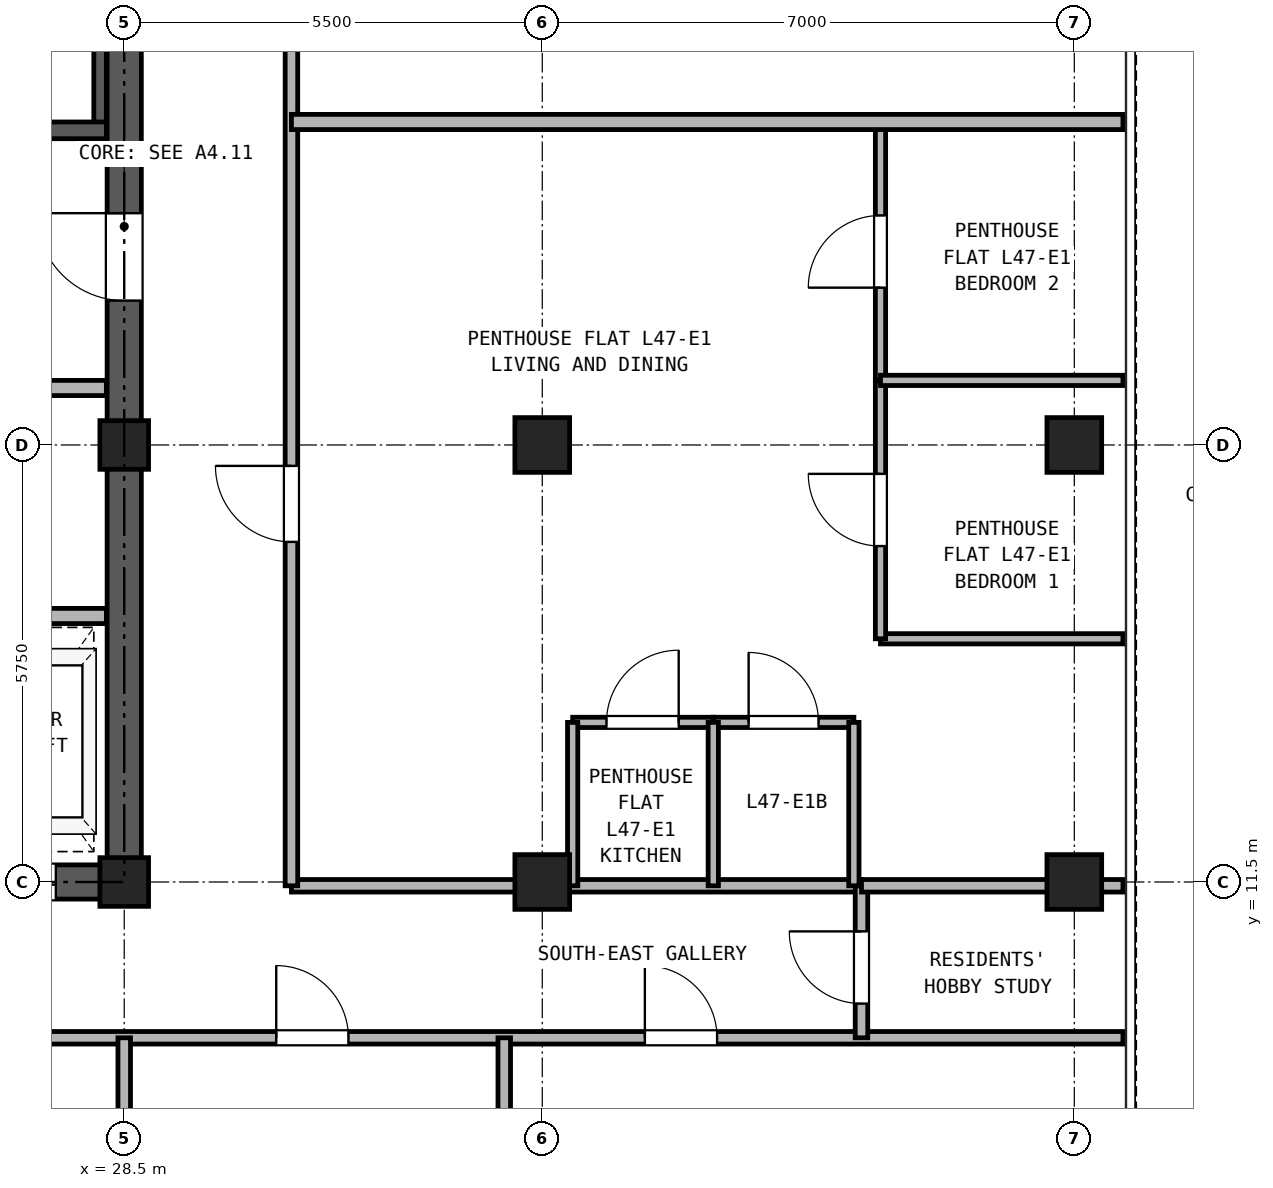
"""IFC4 building model, lengths in metres.
Left out: names, types, materials, properties, quantities, classifications, styles, units other than length and angle.
Written with IfcOpenShell. Run it as: python <this file> out.ifc"""

import sys

from ifc_helpers import new_model, si_unit, direction, frame, frame_2d, origin, origin_2d, place, context, subcontext, project, spatial, rectangle, hollow_rectangle, extrude, source, transform, mapped, element, fill, save


model = new_model("IFC4")
c1 = context("Model", 3, precision=1e-05, world=origin(), true_north=direction((0.0, 1.0)))
c2 = subcontext(c1, "Body", "Model", "MODEL_VIEW")
j1 = project(units=[si_unit("LENGTHUNIT", "METRE"), si_unit("PLANEANGLEUNIT", "RADIAN")], contexts=[c1])
p1 = place(None, origin())
s1 = spatial("IfcSite", under=j1, at=p1, CompositionType="ELEMENT")
p2 = place(p1, origin())
s2 = spatial("IfcBuilding", under=s1, at=p2, CompositionType="ELEMENT")
p3 = place(p2, frame((0.0, 0.0, 168.9)))
s3 = spatial("IfcBuildingStorey", under=s2, at=p3, CompositionType="ELEMENT", Elevation=168.9)
m1 = source(origin(), c2, "Body", "SweptSolid", [
    extrude(hollow_rectangle(XDim=0.72, YDim=0.72, WallThickness=0.04, at=origin_2d()), origin(), (0.0, 0.0, 1.0), 2.95),
])
for number, where, z_axis, x_axis in (
    (1, (41.0, 11.5, 0.0), (0.0, 0.0, 1.0), (1.0, 0.0, 0.0)),
    (2, (41.0, 17.25, 0.0), (0.0, 0.0, 1.0), (1.0, 0.0, 0.0)),
):
    element("IfcColumn", number, at=place(p3, frame(where, z_axis=z_axis, x_axis=x_axis)), inside=s3, PredefinedType="COLUMN", context=c2, shape_type="MappedRepresentation", body=[
        mapped(m1, transform((0.0, 0.0, 0.0), x_axis=(1.0, 0.0, 0.0), y_axis=(0.0, 1.0, 0.0), z_axis=(0.0, 0.0, 1.0), scale=1.0)),
    ])
m2 = source(origin(), c2, "Body", "SweptSolid", [
    extrude(hollow_rectangle(XDim=0.64, YDim=0.64, WallThickness=0.035, at=origin_2d()), origin(), (0.0, 0.0, 1.0), 2.95),
])
for number, where, z_axis, x_axis in (
    (3, (28.5, 11.5, 0.0), (0.0, 0.0, 1.0), (1.0, 0.0, 0.0)),
    (4, (28.5, 17.25, 0.0), (0.0, 0.0, 1.0), (1.0, 0.0, 0.0)),
):
    element("IfcColumn", number, at=place(p3, frame(where, z_axis=z_axis, x_axis=x_axis)), inside=s3, PredefinedType="COLUMN", context=c2, shape_type="MappedRepresentation", body=[
        mapped(m2, transform((0.0, 0.0, 0.0), x_axis=(1.0, 0.0, 0.0), y_axis=(0.0, 1.0, 0.0), z_axis=(0.0, 0.0, 1.0), scale=1.0)),
    ])
for number, where, z_axis, x_axis in (
    (5, (34.0, 11.5, 0.0), (0.0, 0.0, 1.0), (1.0, 0.0, 0.0)),
    (6, (34.0, 17.25, 0.0), (0.0, 0.0, 1.0), (1.0, 0.0, 0.0)),
):
    element("IfcColumn", number, at=place(p3, frame(where, z_axis=z_axis, x_axis=x_axis)), inside=s3, PredefinedType="COLUMN", context=c2, shape_type="MappedRepresentation", body=[
        mapped(m1, transform((0.0, 0.0, 0.0), x_axis=(1.0, 0.0, 0.0), y_axis=(0.0, 1.0, 0.0), z_axis=(0.0, 0.0, 1.0), scale=1.0)),
    ])
p4 = place(p3, frame((18.275, 11.5, 0.0), z_axis=(0.0, 0.0, 1.0), x_axis=(1.0, 0.0, 0.0)))
e7 = element("IfcWall", 7, at=p4, inside=s3, PredefinedType="SHEAR", context=c2, shape_type="SweptSolid", body=[
    extrude(rectangle(XDim=10.45, YDim=0.45, at=frame_2d((5.225, 0.0))), origin(), (0.0, 0.0, 1.0), 2.95),
])
p5 = place(p4, frame((1.825, 0.0, 0.0)))
e8 = element("IfcOpeningElement", 8, at=p5, cuts=e7, PredefinedType="OPENING", context=c2, shape_type="SweptSolid", body=[
    extrude(rectangle(XDim=0.95, YDim=2.15, at=frame_2d((0.475, 1.075))), frame((0.0, 0.235, 0.0), z_axis=(0.0, -1.0, 0.0), x_axis=(1.0, 0.0, 0.0)), (0.0, 0.0, 1.0), 0.47),
])
p6 = place(p4, frame((5.325, 0.0, 0.0)))
e9 = element("IfcOpeningElement", 9, at=p6, cuts=e7, PredefinedType="OPENING", context=c2, shape_type="SweptSolid", body=[
    extrude(rectangle(XDim=0.95, YDim=2.15, at=frame_2d((0.475, 1.075))), frame((0.0, 0.235, 0.0), z_axis=(0.0, -1.0, 0.0), x_axis=(1.0, 0.0, 0.0)), (0.0, 0.0, 1.0), 0.47),
])
p7 = place(p4, frame((8.225, 0.0, 0.0)))
e10 = element("IfcOpeningElement", 10, at=p7, cuts=e7, PredefinedType="OPENING", context=c2, shape_type="SweptSolid", body=[
    extrude(rectangle(XDim=1.1, YDim=2.25, at=frame_2d((0.55, 1.125))), frame((0.0, 0.235, 0.0), z_axis=(0.0, -1.0, 0.0), x_axis=(1.0, 0.0, 0.0)), (0.0, 0.0, 1.0), 0.47),
])
p8 = place(p3, frame((28.5, 11.725, 0.0), z_axis=(0.0, 0.0, 1.0), x_axis=(0.0, 1.0, 0.0)))
e11 = element("IfcWall", 11, at=p8, inside=s3, PredefinedType="SHEAR", context=c2, shape_type="SweptSolid", body=[
    extrude(rectangle(XDim=16.8, YDim=0.45, at=frame_2d((8.4, 0.0))), origin(), (0.0, 0.0, 1.0), 2.95),
])
p9 = place(p8, frame((7.425, 0.0, 0.0)))
e12 = element("IfcOpeningElement", 12, at=p9, cuts=e11, PredefinedType="OPENING", context=c2, shape_type="SweptSolid", body=[
    extrude(rectangle(XDim=1.15, YDim=2.2, at=frame_2d((0.575, 1.1))), frame((0.0, 0.235, 0.0), z_axis=(0.0, -1.0, 0.0), x_axis=(1.0, 0.0, 0.0)), (0.0, 0.0, 1.0), 0.47),
])
p10 = place(p3, frame((28.183, 21.39, 0.0), z_axis=(0.0, 0.0, 1.0), x_axis=(0.0, 1.0, 0.0)))
e13 = element("IfcWall", 13, at=p10, inside=s3, PredefinedType="PARTITIONING", context=c2, shape_type="SweptSolid", body=[
    extrude(rectangle(XDim=6.945, YDim=0.165, at=frame_2d((3.473, 0.0))), origin(), (0.0, 0.0, 1.0), 2.95),
])
p11 = place(p3, frame((25.13, 21.39, 0.0), z_axis=(0.0, 0.0, 1.0), x_axis=(1.0, 0.0, 0.0)))
e14 = element("IfcWall", 14, at=p11, inside=s3, PredefinedType="SOLIDWALL", context=c2, shape_type="SweptSolid", body=[
    extrude(rectangle(XDim=3.135, YDim=0.22, at=frame_2d((1.567, 0.0))), origin(), (0.0, 0.0, 1.0), 2.95),
])
p12 = place(p11, frame((0.92, 0.0, 0.0)))
e15 = element("IfcOpeningElement", 15, at=p12, cuts=e14, PredefinedType="OPENING", context=c2, shape_type="SweptSolid", body=[
    extrude(rectangle(XDim=1.15, YDim=2.2, at=frame_2d((0.575, 1.1))), frame((0.0, 0.12, 0.0), z_axis=(0.0, -1.0, 0.0), x_axis=(1.0, 0.0, 0.0)), (0.0, 0.0, 1.0), 0.24),
])
p13 = place(p3, frame((18.735, 18.0, 0.0), z_axis=(0.0, 0.0, 1.0), x_axis=(1.0, 0.0, 0.0)))
e16 = element("IfcWall", 16, at=p13, inside=s3, PredefinedType="PARTITIONING", context=c2, shape_type="SweptSolid", body=[
    extrude(rectangle(XDim=9.53, YDim=0.2, at=frame_2d((4.765, 0.0))), origin(), (0.0, 0.0, 1.0), 2.95),
])
p14 = place(p13, frame((0.515, 0.0, 0.0)))
e17 = element("IfcOpeningElement", 17, at=p14, cuts=e16, PredefinedType="OPENING", context=c2, shape_type="SweptSolid", body=[
    extrude(rectangle(XDim=1.3, YDim=2.3, at=frame_2d((0.65, 1.15))), frame((0.0, 0.11, 0.0), z_axis=(0.0, -1.0, 0.0), x_axis=(1.0, 0.0, 0.0)), (0.0, 0.0, 1.0), 0.22),
])
p15 = place(p13, frame((2.615, 0.0, 0.0)))
e18 = element("IfcOpeningElement", 18, at=p15, cuts=e16, PredefinedType="OPENING", context=c2, shape_type="SweptSolid", body=[
    extrude(rectangle(XDim=1.3, YDim=2.3, at=frame_2d((0.65, 1.15))), frame((0.0, 0.11, 0.0), z_axis=(0.0, -1.0, 0.0), x_axis=(1.0, 0.0, 0.0)), (0.0, 0.0, 1.0), 0.22),
])
p16 = place(p13, frame((7.115, 0.0, 0.0)))
e19 = element("IfcOpeningElement", 19, at=p16, cuts=e16, PredefinedType="OPENING", context=c2, shape_type="SweptSolid", body=[
    extrude(rectangle(XDim=1.0, YDim=2.15, at=frame_2d((0.5, 1.075))), frame((0.0, 0.11, 0.0), z_axis=(0.0, -1.0, 0.0), x_axis=(1.0, 0.0, 0.0)), (0.0, 0.0, 1.0), 0.22),
])
p17 = place(p3, frame((18.735, 15.0, 0.0), z_axis=(0.0, 0.0, 1.0), x_axis=(1.0, 0.0, 0.0)))
e20 = element("IfcWall", 20, at=p17, inside=s3, PredefinedType="PARTITIONING", context=c2, shape_type="SweptSolid", body=[
    extrude(rectangle(XDim=9.53, YDim=0.2, at=frame_2d((4.765, 0.0))), origin(), (0.0, 0.0, 1.0), 2.95),
])
p18 = place(p3, frame((0.16, 9.45, 0.0), z_axis=(0.0, 0.0, 1.0), x_axis=(1.0, 0.0, 0.0)))
e21 = element("IfcWall", 21, at=p18, inside=s3, PredefinedType="PARTITIONING", context=c2, shape_type="SweptSolid", body=[
    extrude(rectangle(XDim=41.48, YDim=0.165, at=frame_2d((20.74, 0.0))), origin(), (0.0, 0.0, 1.0), 2.95),
])
p19 = place(p18, frame((12.89, 0.0, 0.0)))
e22 = element("IfcOpeningElement", 22, at=p19, cuts=e21, PredefinedType="OPENING", context=c2, shape_type="SweptSolid", body=[
    extrude(rectangle(XDim=0.95, YDim=2.15, at=frame_2d((0.475, 1.075))), frame((0.0, 0.093, 0.0), z_axis=(0.0, -1.0, 0.0), x_axis=(1.0, 0.0, 0.0)), (0.0, 0.0, 1.0), 0.185),
])
p20 = place(p18, frame((23.34, 0.0, 0.0)))
e23 = element("IfcOpeningElement", 23, at=p20, cuts=e21, PredefinedType="OPENING", context=c2, shape_type="SweptSolid", body=[
    extrude(rectangle(XDim=0.95, YDim=2.15, at=frame_2d((0.475, 1.075))), frame((0.0, 0.093, 0.0), z_axis=(0.0, -1.0, 0.0), x_axis=(1.0, 0.0, 0.0)), (0.0, 0.0, 1.0), 0.185),
])
p21 = place(p18, frame((30.34, 0.0, 0.0)))
e24 = element("IfcOpeningElement", 24, at=p21, cuts=e21, PredefinedType="OPENING", context=c2, shape_type="SweptSolid", body=[
    extrude(rectangle(XDim=0.95, YDim=2.15, at=frame_2d((0.475, 1.075))), frame((0.0, 0.093, 0.0), z_axis=(0.0, -1.0, 0.0), x_axis=(1.0, 0.0, 0.0)), (0.0, 0.0, 1.0), 0.185),
])
p22 = place(p18, frame((35.19, 0.0, 0.0)))
e25 = element("IfcOpeningElement", 25, at=p22, cuts=e21, PredefinedType="OPENING", context=c2, shape_type="SweptSolid", body=[
    extrude(rectangle(XDim=0.95, YDim=2.15, at=frame_2d((0.475, 1.075))), frame((0.0, 0.093, 0.0), z_axis=(0.0, -1.0, 0.0), x_axis=(1.0, 0.0, 0.0)), (0.0, 0.0, 1.0), 0.185),
])
p23 = place(p3, frame((30.7, 11.45, 0.0), z_axis=(0.0, 0.0, 1.0), x_axis=(1.0, 0.0, 0.0)))
e26 = element("IfcWall", 26, at=p23, inside=s3, PredefinedType="PARTITIONING", context=c2, shape_type="SweptSolid", body=[
    extrude(rectangle(XDim=7.5, YDim=0.165, at=frame_2d((3.75, 0.0))), origin(), (0.0, 0.0, 1.0), 2.323),
])
p24 = place(p3, frame((38.2, 9.45, 0.0), z_axis=(0.0, 0.0, 1.0), x_axis=(0.0, 1.0, 0.0)))
e27 = element("IfcWall", 27, at=p24, inside=s3, PredefinedType="PARTITIONING", context=c2, shape_type="SweptSolid", body=[
    extrude(rectangle(XDim=2.0, YDim=0.165, at=frame_2d((1.0, 0.0))), origin(), (0.0, 0.0, 1.0), 2.95),
])
p25 = place(p24, frame((0.45, 0.0, 0.0)))
e28 = element("IfcOpeningElement", 28, at=p25, cuts=e27, PredefinedType="OPENING", context=c2, shape_type="SweptSolid", body=[
    extrude(rectangle(XDim=0.95, YDim=2.15, at=frame_2d((0.475, 1.075))), frame((0.0, 0.093, 0.0), z_axis=(0.0, -1.0, 0.0), x_axis=(1.0, 0.0, 0.0)), (0.0, 0.0, 1.0), 0.185),
])
p26 = place(p3, frame((30.7, 11.45, 0.0), z_axis=(0.0, 0.0, 1.0), x_axis=(0.0, 1.0, 0.0)))
e29 = element("IfcWall", 29, at=p26, inside=s3, PredefinedType="PARTITIONING", context=c2, shape_type="SweptSolid", body=[
    extrude(rectangle(XDim=23.69, YDim=0.165, at=frame_2d((11.845, 0.0))), origin(), (0.0, 0.0, 1.0), 2.95),
])
p27 = place(p26, frame((4.525, 0.0, 0.0)))
e30 = element("IfcOpeningElement", 30, at=p27, cuts=e29, PredefinedType="OPENING", context=c2, shape_type="SweptSolid", body=[
    extrude(rectangle(XDim=1.0, YDim=2.15, at=frame_2d((0.5, 1.075))), frame((0.0, 0.093, 0.0), z_axis=(0.0, -1.0, 0.0), x_axis=(1.0, 0.0, 0.0)), (0.0, 0.0, 1.0), 0.185),
])
p28 = place(p26, frame((14.075, 0.0, 0.0)))
e31 = element("IfcOpeningElement", 31, at=p28, cuts=e29, PredefinedType="OPENING", context=c2, shape_type="SweptSolid", body=[
    extrude(rectangle(XDim=1.0, YDim=2.15, at=frame_2d((0.5, 1.075))), frame((0.0, 0.093, 0.0), z_axis=(0.0, -1.0, 0.0), x_axis=(1.0, 0.0, 0.0)), (0.0, 0.0, 1.0), 0.185),
])
p29 = place(p3, frame((28.5, 0.16, 0.0), z_axis=(0.0, 0.0, 1.0), x_axis=(0.0, 1.0, 0.0)))
e32 = element("IfcWall", 32, at=p29, inside=s3, PredefinedType="PARTITIONING", context=c2, shape_type="SweptSolid", body=[
    extrude(rectangle(XDim=9.29, YDim=0.165, at=frame_2d((4.645, 0.0))), origin(), (0.0, 0.0, 1.0), 2.323),
])
p30 = place(p3, frame((33.5, 0.16, 0.0), z_axis=(0.0, 0.0, 1.0), x_axis=(0.0, 1.0, 0.0)))
e33 = element("IfcWall", 33, at=p30, inside=s3, PredefinedType="PARTITIONING", context=c2, shape_type="SweptSolid", body=[
    extrude(rectangle(XDim=9.29, YDim=0.165, at=frame_2d((4.645, 0.0))), origin(), (0.0, 0.0, 1.0), 2.95),
])
p31 = place(p3, frame((38.2, 11.45, 0.0), z_axis=(0.0, 0.0, 1.0), x_axis=(1.0, 0.0, 0.0)))
e34 = element("IfcWall", 34, at=p31, inside=s3, PredefinedType="PARTITIONING", context=c2, shape_type="SweptSolid", body=[
    extrude(rectangle(XDim=3.44, YDim=0.165, at=frame_2d((1.72, 0.0))), origin(), (0.0, 0.0, 1.0), 2.323),
])
p32 = place(p3, frame((34.4, 13.6, 0.0), z_axis=(0.0, 0.0, 1.0), x_axis=(1.0, 0.0, 0.0)))
e35 = element("IfcWall", 35, at=p32, inside=s3, PredefinedType="PARTITIONING", context=c2, shape_type="SweptSolid", body=[
    extrude(rectangle(XDim=1.85, YDim=0.135, at=frame_2d((0.925, 0.0))), origin(), (0.0, 0.0, 1.0), 2.95),
])
p33 = place(p32, frame((0.445, 0.0, 0.0)))
e36 = element("IfcOpeningElement", 36, at=p33, cuts=e35, PredefinedType="OPENING", context=c2, shape_type="SweptSolid", body=[
    extrude(rectangle(XDim=0.95, YDim=2.15, at=frame_2d((0.475, 1.075))), frame((0.0, 0.077, 0.0), z_axis=(0.0, -1.0, 0.0), x_axis=(1.0, 0.0, 0.0)), (0.0, 0.0, 1.0), 0.155),
])
p34 = place(p3, frame((36.25, 13.6, 0.0), z_axis=(0.0, 0.0, 1.0), x_axis=(1.0, 0.0, 0.0)))
e37 = element("IfcWall", 37, at=p34, inside=s3, PredefinedType="PARTITIONING", context=c2, shape_type="SweptSolid", body=[
    extrude(rectangle(XDim=1.85, YDim=0.135, at=frame_2d((0.925, 0.0))), origin(), (0.0, 0.0, 1.0), 2.95),
])
p35 = place(p34, frame((0.465, 0.0, 0.0)))
e38 = element("IfcOpeningElement", 38, at=p35, cuts=e37, PredefinedType="OPENING", context=c2, shape_type="SweptSolid", body=[
    extrude(rectangle(XDim=0.92, YDim=2.1, at=frame_2d((0.46, 1.05))), frame((0.0, 0.077, 0.0), z_axis=(0.0, -1.0, 0.0), x_axis=(1.0, 0.0, 0.0)), (0.0, 0.0, 1.0), 0.155),
])
for number, where, z_axis, x_axis in (
    (39, (34.4, 11.45, 0.0), (0.0, 0.0, 1.0), (0.0, 1.0, 0.0)),
    (40, (36.25, 11.45, 0.0), (0.0, 0.0, 1.0), (0.0, 1.0, 0.0)),
    (41, (38.1, 11.45, 0.0), (0.0, 0.0, 1.0), (0.0, 1.0, 0.0)),
):
    element("IfcWall", number, at=place(p3, frame(where, z_axis=z_axis, x_axis=x_axis)), inside=s3, PredefinedType="PARTITIONING", context=c2, shape_type="SweptSolid", body=[
        extrude(rectangle(XDim=2.15, YDim=0.135, at=frame_2d((1.075, 0.0))), origin(), (0.0, 0.0, 1.0), 2.95),
    ])
p36 = place(p3, frame((38.45, 14.7, 0.0), z_axis=(0.0, 0.0, 1.0), x_axis=(1.0, 0.0, 0.0)))
e42 = element("IfcWall", 42, at=p36, inside=s3, PredefinedType="PARTITIONING", context=c2, shape_type="SweptSolid", body=[
    extrude(rectangle(XDim=3.19, YDim=0.135, at=frame_2d((1.595, 0.0))), origin(), (0.0, 0.0, 1.0), 2.95),
])
p37 = place(p3, frame((38.45, 14.7, 0.0), z_axis=(0.0, 0.0, 1.0), x_axis=(0.0, 1.0, 0.0)))
e43 = element("IfcWall", 43, at=p37, inside=s3, PredefinedType="PARTITIONING", context=c2, shape_type="SweptSolid", body=[
    extrude(rectangle(XDim=3.4, YDim=0.135, at=frame_2d((1.7, 0.0))), origin(), (0.0, 0.0, 1.0), 2.95),
])
p38 = place(p37, frame((1.22, 0.0, 0.0)))
e44 = element("IfcOpeningElement", 44, at=p38, cuts=e43, PredefinedType="OPENING", context=c2, shape_type="SweptSolid", body=[
    extrude(rectangle(XDim=0.95, YDim=2.15, at=frame_2d((0.475, 1.075))), frame((0.0, 0.077, 0.0), z_axis=(0.0, -1.0, 0.0), x_axis=(1.0, 0.0, 0.0)), (0.0, 0.0, 1.0), 0.155),
])
p39 = place(p3, frame((38.45, 18.1, 0.0), z_axis=(0.0, 0.0, 1.0), x_axis=(0.0, 1.0, 0.0)))
e45 = element("IfcWall", 45, at=p39, inside=s3, PredefinedType="PARTITIONING", context=c2, shape_type="SweptSolid", body=[
    extrude(rectangle(XDim=3.4, YDim=0.135, at=frame_2d((1.7, 0.0))), origin(), (0.0, 0.0, 1.0), 2.95),
])
p40 = place(p39, frame((1.22, 0.0, 0.0)))
e46 = element("IfcOpeningElement", 46, at=p40, cuts=e45, PredefinedType="OPENING", context=c2, shape_type="SweptSolid", body=[
    extrude(rectangle(XDim=0.95, YDim=2.15, at=frame_2d((0.475, 1.075))), frame((0.0, 0.077, 0.0), z_axis=(0.0, -1.0, 0.0), x_axis=(1.0, 0.0, 0.0)), (0.0, 0.0, 1.0), 0.155),
])
p41 = place(p3, frame((38.45, 18.1, 0.0), z_axis=(0.0, 0.0, 1.0), x_axis=(1.0, 0.0, 0.0)))
e47 = element("IfcWall", 47, at=p41, inside=s3, PredefinedType="PARTITIONING", context=c2, shape_type="SweptSolid", body=[
    extrude(rectangle(XDim=3.19, YDim=0.135, at=frame_2d((1.595, 0.0))), origin(), (0.0, 0.0, 1.0), 2.95),
])
p42 = place(p3, frame((30.7, 21.5, 0.0), z_axis=(0.0, 0.0, 1.0), x_axis=(1.0, 0.0, 0.0)))
e48 = element("IfcWall", 48, at=p42, inside=s3, PredefinedType="PARTITIONING", context=c2, shape_type="SweptSolid", body=[
    extrude(rectangle(XDim=10.94, YDim=0.2, at=frame_2d((5.47, 0.0))), origin(), (0.0, 0.0, 1.0), 2.95),
])
p43 = place(p9, origin())
e49 = element("IfcDoor", 49, at=p43, inside=s3, OperationType="SINGLE_SWING_RIGHT", PredefinedType="DOOR", context=c2, shape_type="SweptSolid", body=[
    extrude(rectangle(XDim=1.15, YDim=2.2, at=frame_2d((0.575, 1.1))), frame((0.0, 0.025, 0.0), z_axis=(0.0, -1.0, 0.0), x_axis=(1.0, 0.0, 0.0)), (0.0, 0.0, 1.0), 0.05),
])
fill(e12, e49)
p44 = place(p7, frame((1.1, 0.0, 0.0), z_axis=(0.0, 0.0, 1.0), x_axis=(-1.0, 0.0, 0.0)))
e50 = element("IfcDoor", 50, at=p44, inside=s3, OperationType="DOUBLE_DOOR_SLIDING", PredefinedType="DOOR", context=c2, shape_type="SweptSolid", body=[
    extrude(rectangle(XDim=1.1, YDim=2.25, at=frame_2d((0.55, 1.125))), frame((0.0, 0.025, 0.0), z_axis=(0.0, -1.0, 0.0), x_axis=(1.0, 0.0, 0.0)), (0.0, 0.0, 1.0), 0.05),
])
fill(e10, e50)
p45 = place(p21, frame((0.95, 0.0, 0.0), z_axis=(0.0, 0.0, 1.0), x_axis=(-1.0, 0.0, 0.0)))
e51 = element("IfcDoor", 51, at=p45, inside=s3, OperationType="SINGLE_SWING_LEFT", PredefinedType="DOOR", context=c2, shape_type="SweptSolid", body=[
    extrude(rectangle(XDim=0.95, YDim=2.15, at=frame_2d((0.475, 1.075))), frame((0.0, 0.025, 0.0), z_axis=(0.0, -1.0, 0.0), x_axis=(1.0, 0.0, 0.0)), (0.0, 0.0, 1.0), 0.05),
])
fill(e24, e51)
p46 = place(p22, frame((0.95, 0.0, 0.0), z_axis=(0.0, 0.0, 1.0), x_axis=(-1.0, 0.0, 0.0)))
e52 = element("IfcDoor", 52, at=p46, inside=s3, OperationType="SINGLE_SWING_LEFT", PredefinedType="DOOR", context=c2, shape_type="SweptSolid", body=[
    extrude(rectangle(XDim=0.95, YDim=2.15, at=frame_2d((0.475, 1.075))), frame((0.0, 0.025, 0.0), z_axis=(0.0, -1.0, 0.0), x_axis=(1.0, 0.0, 0.0)), (0.0, 0.0, 1.0), 0.05),
])
fill(e25, e52)
p47 = place(p25, origin())
e53 = element("IfcDoor", 53, at=p47, inside=s3, OperationType="SINGLE_SWING_RIGHT", PredefinedType="DOOR", context=c2, shape_type="SweptSolid", body=[
    extrude(rectangle(XDim=0.95, YDim=2.15, at=frame_2d((0.475, 1.075))), frame((0.0, 0.025, 0.0), z_axis=(0.0, -1.0, 0.0), x_axis=(1.0, 0.0, 0.0)), (0.0, 0.0, 1.0), 0.05),
])
fill(e28, e53)
p48 = place(p33, origin())
e54 = element("IfcDoor", 54, at=p48, inside=s3, OperationType="SINGLE_SWING_RIGHT", PredefinedType="DOOR", context=c2, shape_type="SweptSolid", body=[
    extrude(rectangle(XDim=0.95, YDim=2.15, at=frame_2d((0.475, 1.075))), frame((0.0, 0.025, 0.0), z_axis=(0.0, -1.0, 0.0), x_axis=(1.0, 0.0, 0.0)), (0.0, 0.0, 1.0), 0.05),
])
fill(e36, e54)
p49 = place(p35, origin())
e55 = element("IfcDoor", 55, at=p49, inside=s3, OperationType="SINGLE_SWING_LEFT", PredefinedType="DOOR", context=c2, shape_type="SweptSolid", body=[
    extrude(rectangle(XDim=0.92, YDim=2.1, at=frame_2d((0.46, 1.05))), frame((0.0, 0.025, 0.0), z_axis=(0.0, -1.0, 0.0), x_axis=(1.0, 0.0, 0.0)), (0.0, 0.0, 1.0), 0.05),
])
fill(e38, e55)
p50 = place(p38, frame((0.95, 0.0, 0.0), z_axis=(0.0, 0.0, 1.0), x_axis=(-1.0, 0.0, 0.0)))
e56 = element("IfcDoor", 56, at=p50, inside=s3, OperationType="SINGLE_SWING_RIGHT", PredefinedType="DOOR", context=c2, shape_type="SweptSolid", body=[
    extrude(rectangle(XDim=0.95, YDim=2.15, at=frame_2d((0.475, 1.075))), frame((0.0, 0.025, 0.0), z_axis=(0.0, -1.0, 0.0), x_axis=(1.0, 0.0, 0.0)), (0.0, 0.0, 1.0), 0.05),
])
fill(e44, e56)
p51 = place(p40, frame((0.95, 0.0, 0.0), z_axis=(0.0, 0.0, 1.0), x_axis=(-1.0, 0.0, 0.0)))
e57 = element("IfcDoor", 57, at=p51, inside=s3, OperationType="SINGLE_SWING_LEFT", PredefinedType="DOOR", context=c2, shape_type="SweptSolid", body=[
    extrude(rectangle(XDim=0.95, YDim=2.15, at=frame_2d((0.475, 1.075))), frame((0.0, 0.025, 0.0), z_axis=(0.0, -1.0, 0.0), x_axis=(1.0, 0.0, 0.0)), (0.0, 0.0, 1.0), 0.05),
])
fill(e46, e57)
p52 = place(p27, frame((1.0, 0.0, 0.0), z_axis=(0.0, 0.0, 1.0), x_axis=(-1.0, 0.0, 0.0)))
e58 = element("IfcDoor", 58, at=p52, inside=s3, OperationType="SINGLE_SWING_RIGHT", PredefinedType="DOOR", context=c2, shape_type="SweptSolid", body=[
    extrude(rectangle(XDim=1.0, YDim=2.15, at=frame_2d((0.5, 1.075))), frame((0.0, 0.025, 0.0), z_axis=(0.0, -1.0, 0.0), x_axis=(1.0, 0.0, 0.0)), (0.0, 0.0, 1.0), 0.05),
])
fill(e30, e58)
save(model, sys.argv[1])
